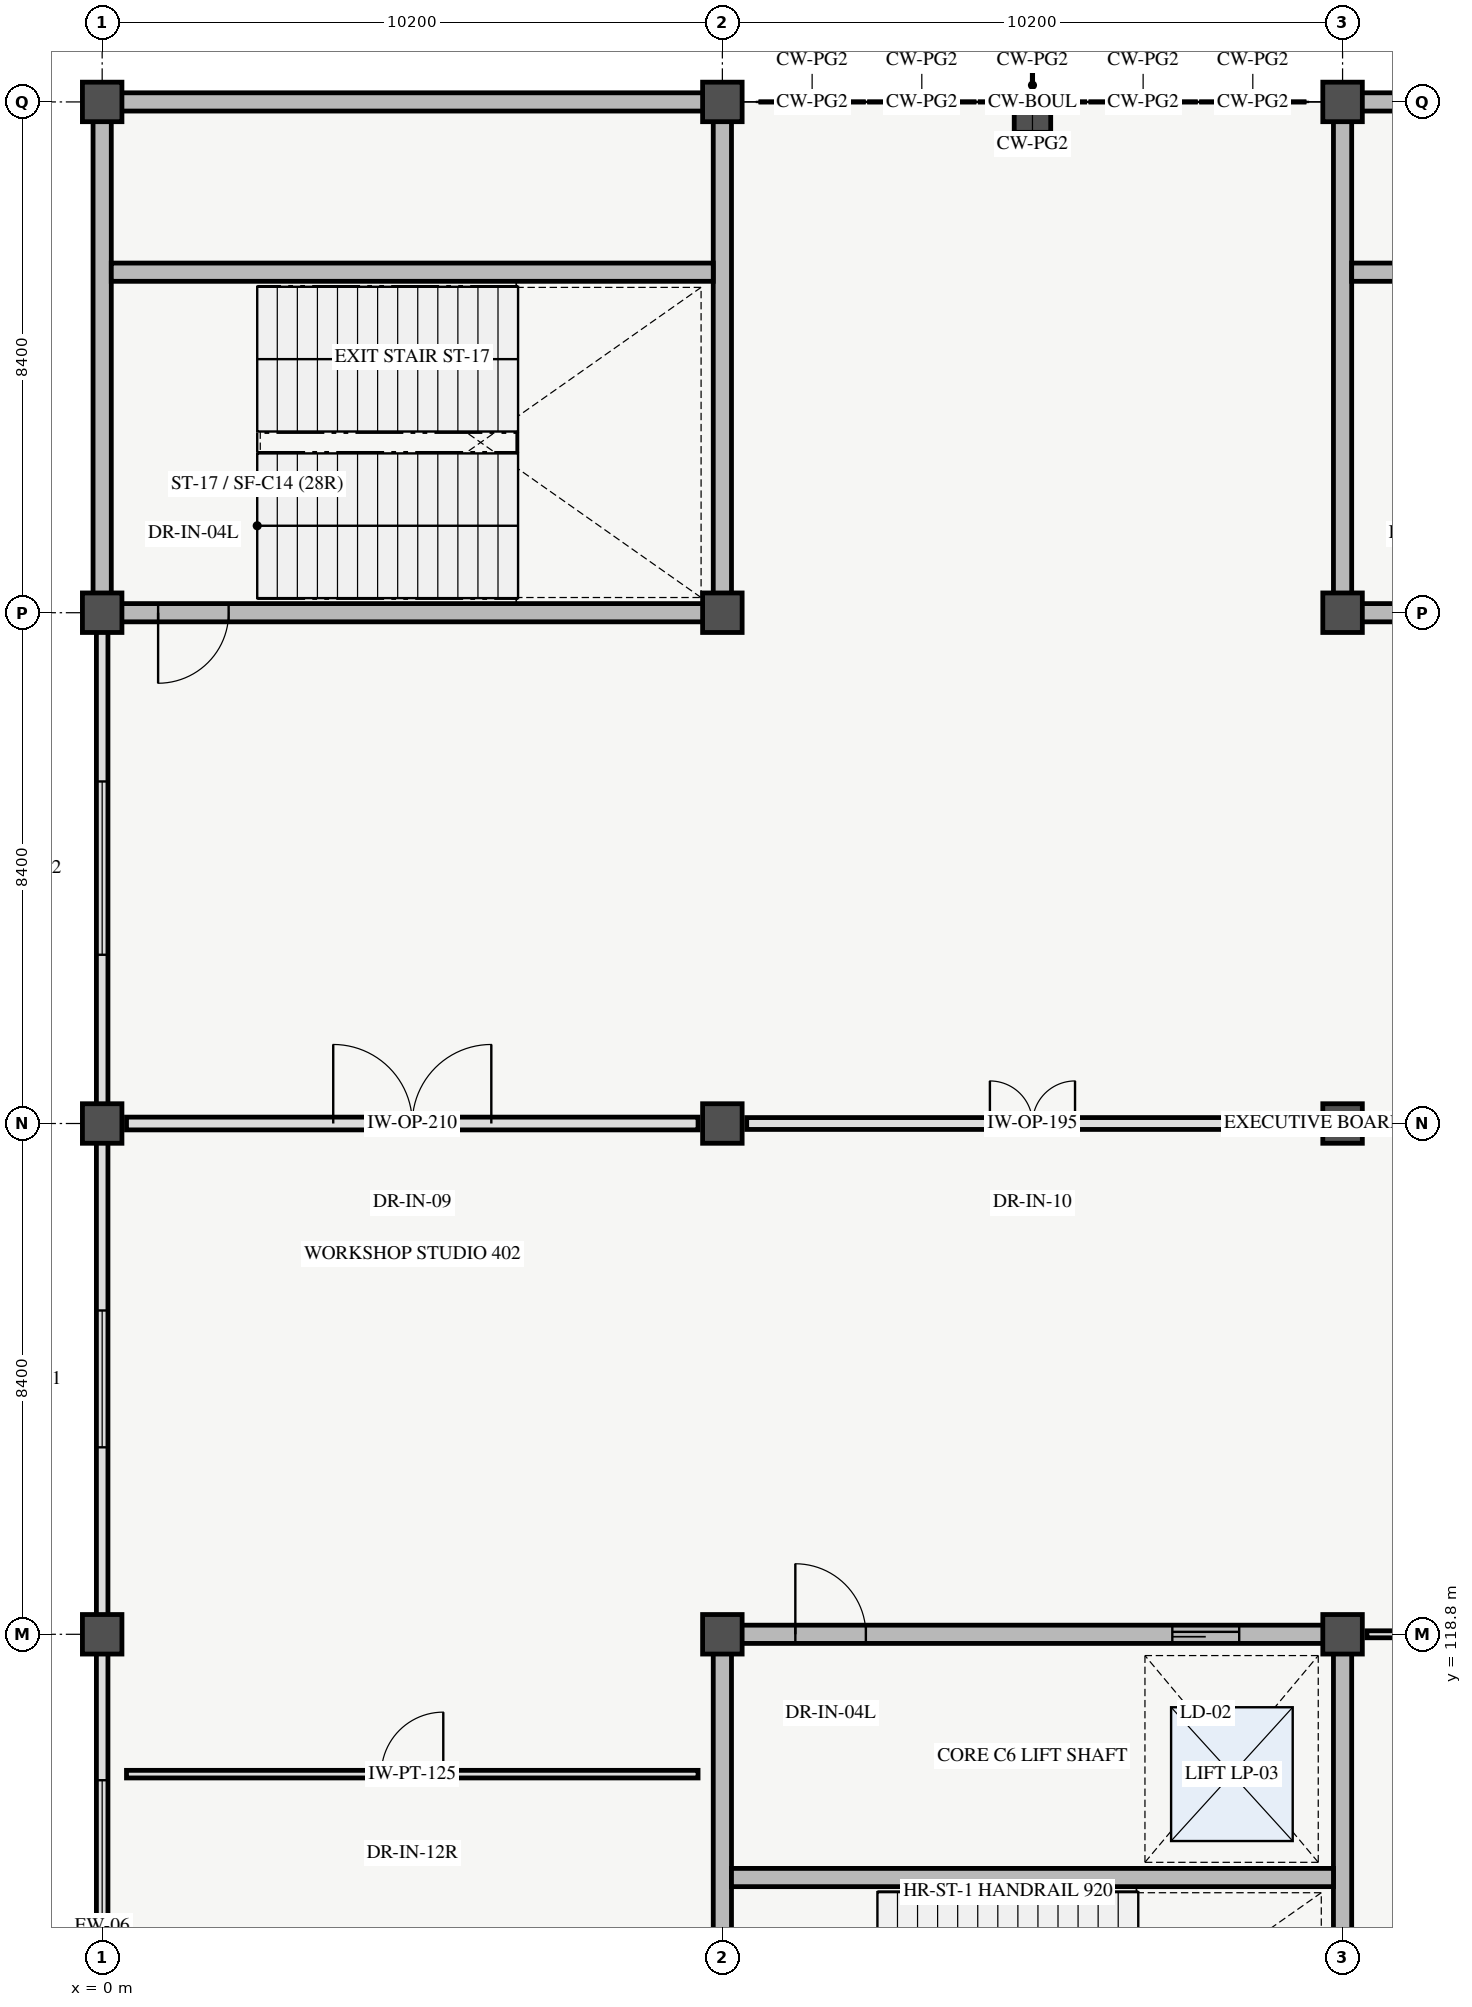
"""IFC4 building model, lengths in metres.
Left out: names, types, materials, properties, quantities, classifications, styles, units other than length and angle.
Written with IfcOpenShell. Run it as: python <this file> out.ifc"""

import sys

from ifc_helpers import new_model, si_unit, direction, frame, frame_2d, origin, origin_2d, place, context, subcontext, project, spatial, rectangle, extrude, element, fill, save


model = new_model("IFC4")
c1 = context("Model", 3, precision=1e-05, world=origin(), true_north=direction((0.0, 1.0)))
c2 = subcontext(c1, "Body", "Model", "MODEL_VIEW")
j1 = project(units=[si_unit("LENGTHUNIT", "METRE"), si_unit("PLANEANGLEUNIT", "RADIAN")], contexts=[c1])
p1 = place(None, origin())
s1 = spatial("IfcSite", under=j1, at=p1, CompositionType="ELEMENT")
p2 = place(p1, origin())
s2 = spatial("IfcBuilding", under=s1, at=p2, CompositionType="ELEMENT")
p3 = place(p2, frame((0.0, 0.0, 15.0)))
s3 = spatial("IfcBuildingStorey", under=s2, at=p3, CompositionType="ELEMENT", Elevation=15.0)
for number, where, z_axis, x_axis in (
    (1, (0.0, 118.8, 0.0), (0.0, 0.0, 1.0), (1.0, 0.0, 0.0)),
    (2, (0.0, 127.2, 0.0), (0.0, 0.0, 1.0), (1.0, 0.0, 0.0)),
    (3, (0.0, 135.6, 0.0), (0.0, 0.0, 1.0), (1.0, 0.0, 0.0)),
    (4, (0.0, 144.0, 0.0), (0.0, 0.0, 1.0), (1.0, 0.0, 0.0)),
    (5, (10.2, 118.8, 0.0), (0.0, 0.0, 1.0), (1.0, 0.0, 0.0)),
    (6, (10.2, 127.2, 0.0), (0.0, 0.0, 1.0), (1.0, 0.0, 0.0)),
    (7, (10.2, 135.6, 0.0), (0.0, 0.0, 1.0), (1.0, 0.0, 0.0)),
    (8, (10.2, 144.0, 0.0), (0.0, 0.0, 1.0), (1.0, 0.0, 0.0)),
    (9, (20.4, 118.8, 0.0), (0.0, 0.0, 1.0), (1.0, 0.0, 0.0)),
    (10, (20.4, 127.2, 0.0), (0.0, 0.0, 1.0), (1.0, 0.0, 0.0)),
    (11, (20.4, 135.6, 0.0), (0.0, 0.0, 1.0), (1.0, 0.0, 0.0)),
    (12, (20.4, 144.0, 0.0), (0.0, 0.0, 1.0), (1.0, 0.0, 0.0)),
):
    element("IfcColumn", number, at=place(p3, frame(where, z_axis=z_axis, x_axis=x_axis)), inside=s3, PredefinedType="COLUMN", context=c2, shape_type="SweptSolid", body=[
        extrude(rectangle(XDim=0.65, YDim=0.65, at=origin_2d()), origin(), (0.0, 0.0, 1.0), 4.2),
    ])
p4 = place(p3, frame((15.3, 143.7, 0.0), z_axis=(0.0, 0.0, 1.0), x_axis=(1.0, 0.0, 0.0)))
e13 = element("IfcColumn", 13, at=p4, inside=s3, PredefinedType="PILASTER", context=c2, shape_type="SweptSolid", body=[
    extrude(rectangle(XDim=0.6, YDim=0.4, at=origin_2d()), origin(), (0.0, 0.0, 1.0), 4.2),
])
p5 = place(p3, frame((10.2, 118.8, 0.0), z_axis=(0.0, 0.0, 1.0), x_axis=(1.0, 0.0, 0.0)))
e14 = element("IfcWall", 14, at=p5, inside=s3, PredefinedType="SHEAR", context=c2, shape_type="SweptSolid", body=[
    extrude(rectangle(XDim=10.2, YDim=0.3, at=frame_2d((5.1, 0.0))), origin(), (0.0, 0.0, 1.0), 4.2),
])
p6 = place(p5, frame((1.2, 0.0, 0.0)))
e15 = element("IfcOpeningElement", 15, at=p6, cuts=e14, PredefinedType="OPENING", context=c2, shape_type="SweptSolid", body=[
    extrude(rectangle(XDim=1.16, YDim=2.2, at=frame_2d((0.58, 1.1))), frame((0.0, 0.16, 0.0), z_axis=(0.0, -1.0, 0.0), x_axis=(1.0, 0.0, 0.0)), (0.0, 0.0, 1.0), 0.32),
])
p7 = place(p5, frame((7.4, 0.0, 0.0)))
e16 = element("IfcOpeningElement", 16, at=p7, cuts=e14, PredefinedType="OPENING", context=c2, shape_type="SweptSolid", body=[
    extrude(rectangle(XDim=1.1, YDim=2.2, at=frame_2d((0.55, 1.1))), frame((0.0, 0.16, 0.0), z_axis=(0.0, -1.0, 0.0), x_axis=(1.0, 0.0, 0.0)), (0.0, 0.0, 1.0), 0.32),
])
for number, where, z_axis, x_axis in (
    (17, (10.2, 109.2, 0.0), (0.0, 0.0, 1.0), (0.0, 1.0, 0.0)),
    (18, (20.4, 109.2, 0.0), (0.0, 0.0, 1.0), (0.0, 1.0, 0.0)),
):
    element("IfcWall", number, at=place(p3, frame(where, z_axis=z_axis, x_axis=x_axis)), inside=s3, PredefinedType="SHEAR", context=c2, shape_type="SweptSolid", body=[
        extrude(rectangle(XDim=9.6, YDim=0.3, at=frame_2d((4.8, 0.0))), origin(), (0.0, 0.0, 1.0), 4.2),
    ])
p8 = place(p3, frame((0.0, 109.44, 0.0), z_axis=(0.0, 0.0, 1.0), x_axis=(0.0, 1.0, 0.0)))
e19 = element("IfcWall", 19, at=p8, inside=s3, PredefinedType="STANDARD", context=c2, shape_type="SweptSolid", body=[
    extrude(rectangle(XDim=9.12, YDim=0.19, at=frame_2d((4.56, 0.0))), origin(), (0.0, 0.0, 1.0), 3.06),
])
p9 = place(p8, frame((2.16, 0.0, 0.9)))
e20 = element("IfcOpeningElement", 20, at=p9, cuts=e19, PredefinedType="OPENING", context=c2, shape_type="SweptSolid", body=[
    extrude(rectangle(XDim=4.8, YDim=2.25, at=frame_2d((2.4, 1.125))), frame((0.0, 0.105, 0.0), z_axis=(0.0, -1.0, 0.0), x_axis=(1.0, 0.0, 0.0)), (0.0, 0.0, 1.0), 0.21),
])
p10 = place(p3, frame((0.0, 119.04, 0.0), z_axis=(0.0, 0.0, 1.0), x_axis=(0.0, 1.0, 0.0)))
e21 = element("IfcWall", 21, at=p10, inside=s3, PredefinedType="STANDARD", context=c2, shape_type="SweptSolid", body=[
    extrude(rectangle(XDim=7.92, YDim=0.19, at=frame_2d((3.96, 0.0))), origin(), (0.0, 0.0, 1.0), 3.06),
])
p11 = place(p10, frame((2.835, 0.0, 0.9)))
e22 = element("IfcOpeningElement", 22, at=p11, cuts=e21, PredefinedType="OPENING", context=c2, shape_type="SweptSolid", body=[
    extrude(rectangle(XDim=2.25, YDim=1.95, at=frame_2d((1.125, 0.975))), frame((0.0, 0.105, 0.0), z_axis=(0.0, -1.0, 0.0), x_axis=(1.0, 0.0, 0.0)), (0.0, 0.0, 1.0), 0.21),
])
p12 = place(p3, frame((0.0, 127.44, 0.0), z_axis=(0.0, 0.0, 1.0), x_axis=(0.0, 1.0, 0.0)))
e23 = element("IfcWall", 23, at=p12, inside=s3, PredefinedType="STANDARD", context=c2, shape_type="SweptSolid", body=[
    extrude(rectangle(XDim=7.92, YDim=0.19, at=frame_2d((3.96, 0.0))), origin(), (0.0, 0.0, 1.0), 3.06),
])
p13 = place(p12, frame((2.535, 0.0, 0.9)))
e24 = element("IfcOpeningElement", 24, at=p13, cuts=e23, PredefinedType="OPENING", context=c2, shape_type="SweptSolid", body=[
    extrude(rectangle(XDim=2.85, YDim=1.95, at=frame_2d((1.425, 0.975))), frame((0.0, 0.105, 0.0), z_axis=(0.0, -1.0, 0.0), x_axis=(1.0, 0.0, 0.0)), (0.0, 0.0, 1.0), 0.21),
])
p14 = place(p3, frame((10.35, 114.8, 0.0), z_axis=(0.0, 0.0, 1.0), x_axis=(1.0, 0.0, 0.0)))
e25 = element("IfcWall", 25, at=p14, inside=s3, PredefinedType="SHEAR", context=c2, shape_type="SweptSolid", body=[
    extrude(rectangle(XDim=9.9, YDim=0.3, at=frame_2d((4.95, 0.0))), origin(), (0.0, 0.0, 1.0), 4.2),
])
p15 = place(p3, frame((20.4, 135.6, 0.0), z_axis=(0.0, 0.0, 1.0), x_axis=(1.0, 0.0, 0.0)))
e26 = element("IfcWall", 26, at=p15, inside=s3, PredefinedType="SHEAR", context=c2, shape_type="SweptSolid", body=[
    extrude(rectangle(XDim=10.2, YDim=0.3, at=frame_2d((5.1, 0.0))), origin(), (0.0, 0.0, 1.0), 4.2),
])
p16 = place(p15, frame((0.92, 0.0, 0.0)))
e27 = element("IfcOpeningElement", 27, at=p16, cuts=e26, PredefinedType="OPENING", context=c2, shape_type="SweptSolid", body=[
    extrude(rectangle(XDim=1.16, YDim=2.2, at=frame_2d((0.58, 1.1))), frame((0.0, 0.16, 0.0), z_axis=(0.0, -1.0, 0.0), x_axis=(1.0, 0.0, 0.0)), (0.0, 0.0, 1.0), 0.32),
])
p17 = place(p3, frame((20.4, 144.0, 0.0), z_axis=(0.0, 0.0, 1.0), x_axis=(1.0, 0.0, 0.0)))
e28 = element("IfcWall", 28, at=p17, inside=s3, PredefinedType="SHEAR", context=c2, shape_type="SweptSolid", body=[
    extrude(rectangle(XDim=10.2, YDim=0.3, at=frame_2d((5.1, 0.0))), origin(), (0.0, 0.0, 1.0), 4.2),
])
p18 = place(p3, frame((20.4, 135.6, 0.0), z_axis=(0.0, 0.0, 1.0), x_axis=(0.0, 1.0, 0.0)))
e29 = element("IfcWall", 29, at=p18, inside=s3, PredefinedType="SHEAR", context=c2, shape_type="SweptSolid", body=[
    extrude(rectangle(XDim=8.4, YDim=0.3, at=frame_2d((4.2, 0.0))), origin(), (0.0, 0.0, 1.0), 4.2),
])
p19 = place(p3, frame((20.55, 141.2, 0.0), z_axis=(0.0, 0.0, 1.0), x_axis=(1.0, 0.0, 0.0)))
e30 = element("IfcWall", 30, at=p19, inside=s3, PredefinedType="SHEAR", context=c2, shape_type="SweptSolid", body=[
    extrude(rectangle(XDim=9.9, YDim=0.3, at=frame_2d((4.95, 0.0))), origin(), (0.0, 0.0, 1.0), 4.2),
])
p20 = place(p3, frame((0.0, 135.6, 0.0), z_axis=(0.0, 0.0, 1.0), x_axis=(1.0, 0.0, 0.0)))
e31 = element("IfcWall", 31, at=p20, inside=s3, PredefinedType="SHEAR", context=c2, shape_type="SweptSolid", body=[
    extrude(rectangle(XDim=10.2, YDim=0.3, at=frame_2d((5.1, 0.0))), origin(), (0.0, 0.0, 1.0), 4.2),
])
p21 = place(p20, frame((0.92, 0.0, 0.0)))
e32 = element("IfcOpeningElement", 32, at=p21, cuts=e31, PredefinedType="OPENING", context=c2, shape_type="SweptSolid", body=[
    extrude(rectangle(XDim=1.16, YDim=2.2, at=frame_2d((0.58, 1.1))), frame((0.0, 0.16, 0.0), z_axis=(0.0, -1.0, 0.0), x_axis=(1.0, 0.0, 0.0)), (0.0, 0.0, 1.0), 0.32),
])
p22 = place(p3, frame((0.0, 144.0, 0.0), z_axis=(0.0, 0.0, 1.0), x_axis=(1.0, 0.0, 0.0)))
e33 = element("IfcWall", 33, at=p22, inside=s3, PredefinedType="SHEAR", context=c2, shape_type="SweptSolid", body=[
    extrude(rectangle(XDim=10.2, YDim=0.3, at=frame_2d((5.1, 0.0))), origin(), (0.0, 0.0, 1.0), 4.2),
])
for number, where, z_axis, x_axis in (
    (34, (0.0, 135.6, 0.0), (0.0, 0.0, 1.0), (0.0, 1.0, 0.0)),
    (35, (10.2, 135.6, 0.0), (0.0, 0.0, 1.0), (0.0, 1.0, 0.0)),
):
    element("IfcWall", number, at=place(p3, frame(where, z_axis=z_axis, x_axis=x_axis)), inside=s3, PredefinedType="SHEAR", context=c2, shape_type="SweptSolid", body=[
        extrude(rectangle(XDim=8.4, YDim=0.3, at=frame_2d((4.2, 0.0))), origin(), (0.0, 0.0, 1.0), 4.2),
    ])
p23 = place(p3, frame((0.15, 141.2, 0.0), z_axis=(0.0, 0.0, 1.0), x_axis=(1.0, 0.0, 0.0)))
e36 = element("IfcWall", 36, at=p23, inside=s3, PredefinedType="SHEAR", context=c2, shape_type="SweptSolid", body=[
    extrude(rectangle(XDim=9.9, YDim=0.3, at=frame_2d((4.95, 0.0))), origin(), (0.0, 0.0, 1.0), 4.2),
])
p24 = place(p3, frame((0.4, 127.2, 0.0), z_axis=(0.0, 0.0, 1.0), x_axis=(1.0, 0.0, 0.0)))
e37 = element("IfcWall", 37, at=p24, inside=s3, PredefinedType="MOVABLE", context=c2, shape_type="SweptSolid", body=[
    extrude(rectangle(XDim=9.4, YDim=0.21, at=frame_2d((4.7, 0.0))), origin(), (0.0, 0.0, 1.0), 3.06),
])
p25 = place(p24, frame((3.4, 0.0, 0.0)))
e38 = element("IfcOpeningElement", 38, at=p25, cuts=e37, PredefinedType="OPENING", context=c2, shape_type="SweptSolid", body=[
    extrude(rectangle(XDim=2.6, YDim=2.4, at=frame_2d((1.3, 1.2))), frame((0.0, 0.115, 0.0), z_axis=(0.0, -1.0, 0.0), x_axis=(1.0, 0.0, 0.0)), (0.0, 0.0, 1.0), 0.23),
])
p26 = place(p3, frame((10.6, 127.2, 0.0), z_axis=(0.0, 0.0, 1.0), x_axis=(1.0, 0.0, 0.0)))
e39 = element("IfcWall", 39, at=p26, inside=s3, PredefinedType="MOVABLE", context=c2, shape_type="SweptSolid", body=[
    extrude(rectangle(XDim=9.4, YDim=0.195, at=frame_2d((4.7, 0.0))), origin(), (0.0, 0.0, 1.0), 3.06),
])
p27 = place(p26, frame((4.0, 0.0, 0.0)))
e40 = element("IfcOpeningElement", 40, at=p27, cuts=e39, PredefinedType="OPENING", context=c2, shape_type="SweptSolid", body=[
    extrude(rectangle(XDim=1.4, YDim=2.2, at=frame_2d((0.7, 1.1))), frame((0.0, 0.107, 0.0), z_axis=(0.0, -1.0, 0.0), x_axis=(1.0, 0.0, 0.0)), (0.0, 0.0, 1.0), 0.215),
])
p28 = place(p3, frame((0.4, 116.5, 0.0), z_axis=(0.0, 0.0, 1.0), x_axis=(1.0, 0.0, 0.0)))
e41 = element("IfcWall", 41, at=p28, inside=s3, PredefinedType="PARTITIONING", context=c2, shape_type="SweptSolid", body=[
    extrude(rectangle(XDim=9.4, YDim=0.125, at=frame_2d((4.7, 0.0))), origin(), (0.0, 0.0, 1.0), 3.06),
])
p29 = place(p28, frame((4.19, 0.0, 0.0)))
e42 = element("IfcOpeningElement", 42, at=p29, cuts=e41, PredefinedType="OPENING", context=c2, shape_type="SweptSolid", body=[
    extrude(rectangle(XDim=1.02, YDim=2.12, at=frame_2d((0.51, 1.06))), frame((0.0, 0.073, 0.0), z_axis=(0.0, -1.0, 0.0), x_axis=(1.0, 0.0, 0.0)), (0.0, 0.0, 1.0), 0.145),
])
p30 = place(p3, frame((20.8, 118.8, 0.0), z_axis=(0.0, 0.0, 1.0), x_axis=(1.0, 0.0, 0.0)))
e43 = element("IfcWall", 43, at=p30, inside=s3, PredefinedType="PARTITIONING", context=c2, shape_type="SweptSolid", body=[
    extrude(rectangle(XDim=9.4, YDim=0.115, at=frame_2d((4.7, 0.0))), origin(), (0.0, 0.0, 1.0), 3.06),
])
p31 = place(p30, frame((4.16, 0.0, 0.0)))
e44 = element("IfcOpeningElement", 44, at=p31, cuts=e43, PredefinedType="OPENING", context=c2, shape_type="SweptSolid", body=[
    extrude(rectangle(XDim=1.08, YDim=2.18, at=frame_2d((0.54, 1.09))), frame((0.0, 0.067, 0.0), z_axis=(0.0, -1.0, 0.0), x_axis=(1.0, 0.0, 0.0)), (0.0, 0.0, 1.0), 0.135),
])
p32 = place(p9, origin())
e45 = element("IfcWindow", 45, at=p32, inside=s3, PartitioningType="TRIPLE_PANEL_VERTICAL", PredefinedType="WINDOW", context=c2, shape_type="SweptSolid", body=[
    extrude(rectangle(XDim=4.8, YDim=2.25, at=frame_2d((2.4, 1.125))), frame((0.0, 0.03, 0.0), z_axis=(0.0, -1.0, 0.0), x_axis=(1.0, 0.0, 0.0)), (0.0, 0.0, 1.0), 0.06),
])
fill(e20, e45)
p33 = place(p11, origin())
e46 = element("IfcWindow", 46, at=p33, inside=s3, PartitioningType="DOUBLE_PANEL_VERTICAL", PredefinedType="WINDOW", context=c2, shape_type="SweptSolid", body=[
    extrude(rectangle(XDim=2.25, YDim=1.95, at=frame_2d((1.125, 0.975))), frame((0.0, 0.03, 0.0), z_axis=(0.0, -1.0, 0.0), x_axis=(1.0, 0.0, 0.0)), (0.0, 0.0, 1.0), 0.06),
])
fill(e22, e46)
p34 = place(p13, origin())
e47 = element("IfcWindow", 47, at=p34, inside=s3, PartitioningType="TRIPLE_PANEL_VERTICAL", PredefinedType="WINDOW", context=c2, shape_type="SweptSolid", body=[
    extrude(rectangle(XDim=2.85, YDim=1.95, at=frame_2d((1.425, 0.975))), frame((0.0, 0.03, 0.0), z_axis=(0.0, -1.0, 0.0), x_axis=(1.0, 0.0, 0.0)), (0.0, 0.0, 1.0), 0.06),
])
fill(e24, e47)
p35 = place(p6, origin())
e48 = element("IfcDoor", 48, at=p35, inside=s3, OperationType="SINGLE_SWING_LEFT", PredefinedType="DOOR", context=c2, shape_type="SweptSolid", body=[
    extrude(rectangle(XDim=1.16, YDim=2.2, at=frame_2d((0.58, 1.1))), frame((0.0, 0.025, 0.0), z_axis=(0.0, -1.0, 0.0), x_axis=(1.0, 0.0, 0.0)), (0.0, 0.0, 1.0), 0.05),
])
fill(e15, e48)
p36 = place(p7, origin())
e49 = element("IfcDoor", 49, at=p36, inside=s3, OperationType="SLIDING_TO_RIGHT", PredefinedType="DOOR", context=c2, shape_type="SweptSolid", body=[
    extrude(rectangle(XDim=1.1, YDim=2.2, at=frame_2d((0.55, 1.1))), frame((0.0, 0.025, 0.0), z_axis=(0.0, -1.0, 0.0), x_axis=(1.0, 0.0, 0.0)), (0.0, 0.0, 1.0), 0.05),
])
fill(e16, e49)
p37 = place(p21, origin())
e50 = element("IfcDoor", 50, at=p37, inside=s3, OperationType="SINGLE_SWING_LEFT", PredefinedType="DOOR", context=c2, shape_type="SweptSolid", body=[
    extrude(rectangle(XDim=1.16, YDim=2.2, at=frame_2d((0.58, 1.1))), frame((0.0, 0.025, 0.0), z_axis=(0.0, -1.0, 0.0), x_axis=(1.0, 0.0, 0.0)), (0.0, 0.0, 1.0), 0.05),
])
fill(e32, e50)
p38 = place(p25, origin())
e51 = element("IfcDoor", 51, at=p38, inside=s3, OperationType="DOUBLE_DOOR_SINGLE_SWING", PredefinedType="DOOR", context=c2, shape_type="SweptSolid", body=[
    extrude(rectangle(XDim=2.6, YDim=2.4, at=frame_2d((1.3, 1.2))), frame((0.0, 0.025, 0.0), z_axis=(0.0, -1.0, 0.0), x_axis=(1.0, 0.0, 0.0)), (0.0, 0.0, 1.0), 0.05),
])
fill(e38, e51)
p39 = place(p27, origin())
e52 = element("IfcDoor", 52, at=p39, inside=s3, OperationType="DOUBLE_DOOR_SINGLE_SWING", PredefinedType="DOOR", context=c2, shape_type="SweptSolid", body=[
    extrude(rectangle(XDim=1.4, YDim=2.2, at=frame_2d((0.7, 1.1))), frame((0.0, 0.025, 0.0), z_axis=(0.0, -1.0, 0.0), x_axis=(1.0, 0.0, 0.0)), (0.0, 0.0, 1.0), 0.05),
])
fill(e40, e52)
p40 = place(p29, origin())
e53 = element("IfcDoor", 53, at=p40, inside=s3, OperationType="SINGLE_SWING_RIGHT", PredefinedType="DOOR", context=c2, shape_type="SweptSolid", body=[
    extrude(rectangle(XDim=1.02, YDim=2.12, at=frame_2d((0.51, 1.06))), frame((0.0, 0.025, 0.0), z_axis=(0.0, -1.0, 0.0), x_axis=(1.0, 0.0, 0.0)), (0.0, 0.0, 1.0), 0.05),
])
fill(e42, e53)
save(model, sys.argv[1])
